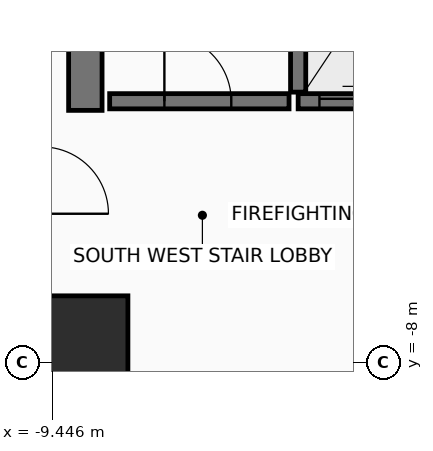
"""IFC4 building model, lengths in metres.
Left out: names, types, materials, properties, quantities, classifications, styles, units other than length and angle.
Written with IfcOpenShell. Run it as: python <this file> out.ifc"""

import sys

from ifc_helpers import new_model, si_unit, direction, frame, frame_2d, origin, origin_2d, place, context, subcontext, project, spatial, rectangle, extrude, element, fill, save


model = new_model("IFC4")
c1 = context("Model", 3, precision=1e-05, world=origin(), true_north=direction((0.0, 1.0)))
c2 = subcontext(c1, "Body", "Model", "MODEL_VIEW")
j1 = project(units=[si_unit("LENGTHUNIT", "METRE"), si_unit("PLANEANGLEUNIT", "RADIAN")], contexts=[c1])
p1 = place(None, origin())
s1 = spatial("IfcSite", under=j1, at=p1, CompositionType="ELEMENT")
p2 = place(p1, origin())
s2 = spatial("IfcBuilding", under=s1, at=p2, CompositionType="ELEMENT")
p3 = place(p2, frame((0.0, 0.0, 81.1)))
s3 = spatial("IfcBuildingStorey", under=s2, at=p3, CompositionType="ELEMENT", Elevation=81.1)
p4 = place(p3, frame((-8.9, -7.6, 0.0), z_axis=(0.0, 0.0, 1.0), x_axis=(1.0, 0.0, 0.0)))
e1 = element("IfcColumn", 1, at=p4, inside=s3, PredefinedType="COLUMN", context=c2, shape_type="SweptSolid", body=[
    extrude(rectangle(XDim=1.4, YDim=1.4, at=origin_2d()), origin(), (0.0, 0.0, 1.0), 5.0),
])
p5 = place(p3, frame((-8.9, -3.85, 0.0), z_axis=(0.0, 0.0, 1.0), x_axis=(0.0, 1.0, 0.0)))
e2 = element("IfcWall", 2, at=p5, inside=s3, PredefinedType="SHEAR", context=c2, shape_type="SweptSolid", body=[
    extrude(rectangle(XDim=10.7, YDim=0.55, at=frame_2d((5.35, 0.0))), origin(), (0.0, 0.0, 1.0), 4.81),
])
p6 = place(p3, frame((-5.4, -3.55, 0.0), z_axis=(0.0, 0.0, 1.0), x_axis=(0.0, 1.0, 0.0)))
e3 = element("IfcWall", 3, at=p6, inside=s3, PredefinedType="SHEAR", context=c2, shape_type="SweptSolid", body=[
    extrude(rectangle(XDim=7.3, YDim=0.25, at=frame_2d((3.65, 0.0))), origin(), (0.0, 0.0, 1.0), 4.81),
])
p7 = place(p3, frame((-8.5, -3.7, 0.0), z_axis=(0.0, 0.0, 1.0), x_axis=(1.0, 0.0, 0.0)))
e4 = element("IfcWall", 4, at=p7, inside=s3, PredefinedType="SHEAR", context=c2, shape_type="SweptSolid", body=[
    extrude(rectangle(XDim=2.95, YDim=0.25, at=frame_2d((1.475, 0.0))), origin(), (0.0, 0.0, 1.0), 4.81),
])
p8 = place(p7, frame((0.9, 0.0, 0.0)))
e5 = element("IfcOpeningElement", 5, at=p8, cuts=e4, PredefinedType="OPENING", context=c2, shape_type="SweptSolid", body=[
    extrude(rectangle(XDim=1.1, YDim=2.15, at=frame_2d((0.55, 1.075))), frame((0.0, 0.135, 0.0), z_axis=(0.0, -1.0, 0.0), x_axis=(1.0, 0.0, 0.0)), (0.0, 0.0, 1.0), 0.27),
])
p9 = place(p3, frame((-5.4, -3.7, 0.0), z_axis=(0.0, 0.0, 1.0), x_axis=(1.0, 0.0, 0.0)))
e6 = element("IfcWall", 6, at=p9, inside=s3, PredefinedType="SHEAR", context=c2, shape_type="SweptSolid", body=[
    extrude(rectangle(XDim=1.9, YDim=0.25, at=frame_2d((0.95, 0.0))), origin(), (0.0, 0.0, 1.0), 4.81),
])
p10 = place(p9, frame((0.35, 0.0, 0.0)))
e7 = element("IfcOpeningElement", 7, at=p10, cuts=e6, PredefinedType="OPENING", context=c2, shape_type="SweptSolid", body=[
    extrude(rectangle(XDim=1.2, YDim=2.2, at=frame_2d((0.6, 1.1))), frame((0.0, 0.135, 0.0), z_axis=(0.0, -1.0, 0.0), x_axis=(1.0, 0.0, 0.0)), (0.0, 0.0, 1.0), 0.27),
])
p11 = place(p8, origin())
e8 = element("IfcDoor", 8, at=p11, inside=s3, OperationType="SINGLE_SWING_LEFT", PredefinedType="DOOR", context=c2, shape_type="SweptSolid", body=[
    extrude(rectangle(XDim=1.1, YDim=2.15, at=frame_2d((0.55, 1.075))), frame((0.0, 0.025, 0.0), z_axis=(0.0, -1.0, 0.0), x_axis=(1.0, 0.0, 0.0)), (0.0, 0.0, 1.0), 0.05),
])
fill(e5, e8)
p12 = place(p10, origin())
e9 = element("IfcDoor", 9, at=p12, inside=s3, OperationType="SLIDING_TO_RIGHT", PredefinedType="DOOR", context=c2, shape_type="SweptSolid", body=[
    extrude(rectangle(XDim=1.2, YDim=2.2, at=frame_2d((0.6, 1.1))), frame((0.0, 0.025, 0.0), z_axis=(0.0, -1.0, 0.0), x_axis=(1.0, 0.0, 0.0)), (0.0, 0.0, 1.0), 0.05),
])
fill(e7, e9)
save(model, sys.argv[1])
